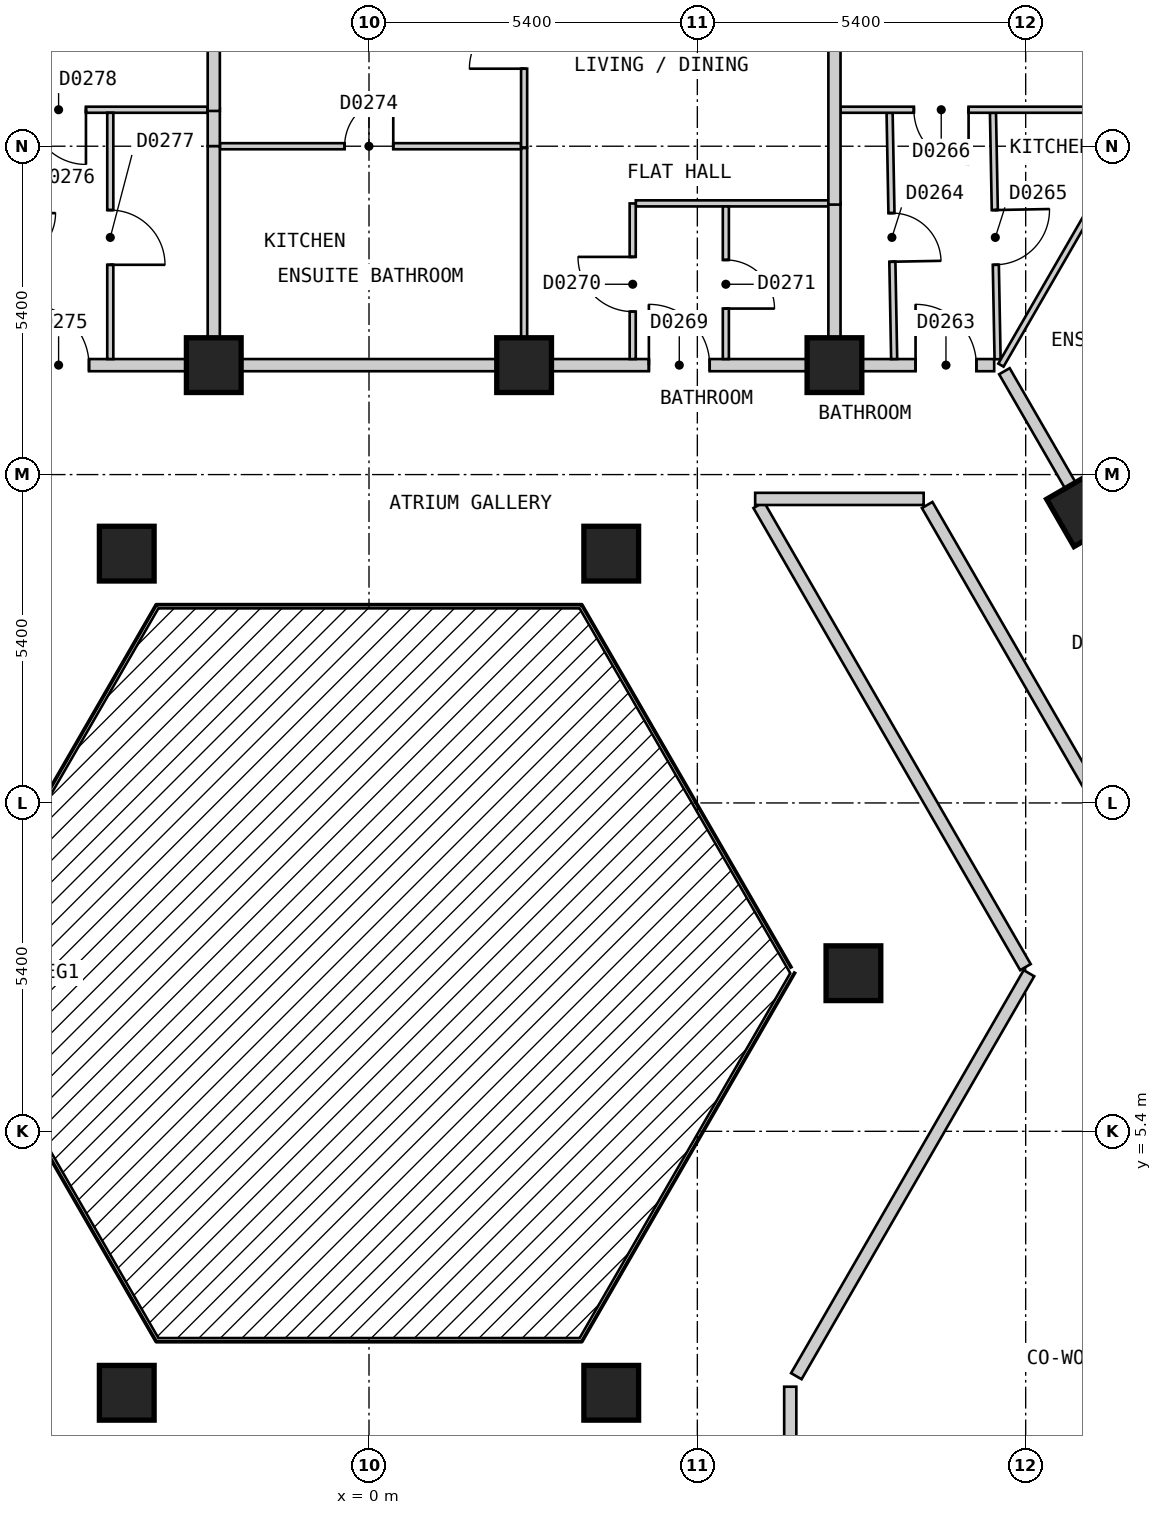
"""IFC4 building model, lengths in metres.
Left out: names, types, materials, properties, quantities, classifications, styles, units other than length and angle.
Written with IfcOpenShell. Run it as: python <this file> out.ifc"""

import sys

from ifc_helpers import new_model, si_unit, direction, frame, frame_2d, origin, origin_2d, place, context, subcontext, project, spatial, rectangle, extrude, element, fill, save


model = new_model("IFC4")
c1 = context("Model", 3, precision=1e-05, world=origin(), true_north=direction((0.0, 1.0)))
c2 = subcontext(c1, "Body", "Model", "MODEL_VIEW")
j1 = project(units=[si_unit("LENGTHUNIT", "METRE"), si_unit("PLANEANGLEUNIT", "RADIAN")], contexts=[c1])
p1 = place(None, origin())
s1 = spatial("IfcSite", under=j1, at=p1, CompositionType="ELEMENT")
p2 = place(p1, origin())
s2 = spatial("IfcBuilding", under=s1, at=p2, CompositionType="ELEMENT")
p3 = place(p2, frame((0.0, 0.0, 41.4)))
s3 = spatial("IfcBuildingStorey", under=s2, at=p3, CompositionType="ELEMENT", Elevation=41.4)
for number, where, z_axis, x_axis in (
    (1, (3.984, 1.1, 0.0), (0.0, 0.0, 1.0), (1.0, 0.0, 0.0)),
    (2, (7.967, 8.0, 0.0), (0.0, 0.0, 1.0), (1.0, 0.0, 0.0)),
    (3, (11.76, 15.631, 0.0), (0.0, 0.0, 1.0), (-0.5, 0.866, 0.0)),
    (4, (7.655, 18.0, 0.0), (0.0, 0.0, 1.0), (-1.0, 0.0, 0.0)),
    (5, (3.984, 14.9, 0.0), (0.0, 0.0, 1.0), (1.0, 0.0, 0.0)),
    (6, (2.551, 18.0, 0.0), (0.0, 0.0, 1.0), (-1.0, 0.0, 0.0)),
    (7, (-2.553, 18.0, 0.0), (0.0, 0.0, 1.0), (-1.0, 0.0, 0.0)),
    (8, (-3.984, 14.9, 0.0), (0.0, 0.0, 1.0), (1.0, 0.0, 0.0)),
    (9, (-3.984, 1.1, 0.0), (0.0, 0.0, 1.0), (1.0, 0.0, 0.0)),
):
    element("IfcColumn", number, at=place(p3, frame(where, z_axis=z_axis, x_axis=x_axis)), inside=s3, PredefinedType="COLUMN", context=c2, shape_type="SweptSolid", body=[
        extrude(rectangle(XDim=0.9, YDim=0.9, at=origin_2d()), origin(), (0.0, 0.0, 1.0), 3.0),
    ])
p4 = place(p3, frame((6.409, 15.7, 0.0), z_axis=(0.0, 0.0, 1.0), x_axis=(0.499930377127, -0.866065596838, 0.0)))
e10 = element("IfcWall", 10, at=p4, inside=s3, PredefinedType="PARTITIONING", context=c2, shape_type="SweptSolid", body=[
    extrude(rectangle(XDim=8.775, YDim=0.2, at=frame_2d((4.388, 0.0))), origin(), (0.0, 0.0, 1.0), 2.7),
])
p5 = place(p3, frame((9.18, 15.7, 0.0), z_axis=(0.0, 0.0, 1.0), x_axis=(0.500003652032, -0.866023295272, 0.0)))
e11 = element("IfcWall", 11, at=p5, inside=s3, PredefinedType="PARTITIONING", context=c2, shape_type="SweptSolid", body=[
    extrude(rectangle(XDim=18.012, YDim=0.2, at=frame_2d((9.006, 0.0))), origin(), (0.0, 0.0, 1.0), 2.7),
])
p6 = place(p5, frame((8.556, 0.0, 0.0)))
e12 = element("IfcOpeningElement", 12, at=p6, cuts=e11, PredefinedType="OPENING", context=c2, shape_type="SweptSolid", body=[
    extrude(rectangle(XDim=0.9, YDim=2.1, at=frame_2d((0.45, 1.05))), frame((0.0, 0.11, 0.0), z_axis=(0.0, -1.0, 0.0), x_axis=(1.0, 0.0, 0.0)), (0.0, 0.0, 1.0), 0.22),
])
p7 = place(p3, frame((10.45, 17.9, 0.0), z_axis=(0.0, 0.0, 1.0), x_axis=(0.500034352617, -0.866005569383, 0.0)))
e13 = element("IfcWall", 13, at=p7, inside=s3, PredefinedType="PARTITIONING", context=c2, shape_type="SweptSolid", body=[
    extrude(rectangle(XDim=20.553, YDim=0.2, at=frame_2d((10.276, 0.0))), origin(), (0.0, 0.0, 1.0), 2.7),
])
p8 = place(p7, frame((14.879, 0.0, 0.0)))
e14 = element("IfcOpeningElement", 14, at=p8, cuts=e13, PredefinedType="OPENING", context=c2, shape_type="SweptSolid", body=[
    extrude(rectangle(XDim=1.0, YDim=2.1, at=frame_2d((0.5, 1.05))), frame((0.0, 0.11, 0.0), z_axis=(0.0, -1.0, 0.0), x_axis=(1.0, 0.0, 0.0)), (0.0, 0.0, 1.0), 0.22),
])
p9 = place(p7, frame((9.775, 0.0, 0.0)))
e15 = element("IfcOpeningElement", 15, at=p9, cuts=e13, PredefinedType="OPENING", context=c2, shape_type="SweptSolid", body=[
    extrude(rectangle(XDim=1.0, YDim=2.1, at=frame_2d((0.5, 1.05))), frame((0.0, 0.11, 0.0), z_axis=(0.0, -1.0, 0.0), x_axis=(1.0, 0.0, 0.0)), (0.0, 0.0, 1.0), 0.22),
])
p10 = place(p7, frame((4.671, 0.0, 0.0)))
e16 = element("IfcOpeningElement", 16, at=p10, cuts=e13, PredefinedType="OPENING", context=c2, shape_type="SweptSolid", body=[
    extrude(rectangle(XDim=1.0, YDim=2.1, at=frame_2d((0.5, 1.05))), frame((0.0, 0.11, 0.0), z_axis=(0.0, -1.0, 0.0), x_axis=(1.0, 0.0, 0.0)), (0.0, 0.0, 1.0), 0.22),
])
p11 = place(p3, frame((6.351, 15.8, 0.0), z_axis=(0.0, 0.0, 1.0), x_axis=(1.0, 0.0, 0.0)))
e17 = element("IfcWall", 17, at=p11, inside=s3, PredefinedType="PARTITIONING", context=c2, shape_type="SweptSolid", body=[
    extrude(rectangle(XDim=2.771, YDim=0.2, at=frame_2d((1.385, 0.0))), origin(), (0.0, 0.0, 1.0), 2.7),
])
p12 = place(p3, frame((-10.276, 18.0, 0.0), z_axis=(0.0, 0.0, 1.0), x_axis=(1.0, 0.0, 0.0)))
e18 = element("IfcWall", 18, at=p12, inside=s3, PredefinedType="PARTITIONING", context=c2, shape_type="SweptSolid", body=[
    extrude(rectangle(XDim=20.558, YDim=0.2, at=frame_2d((10.279, 0.0))), origin(), (0.0, 0.0, 1.0), 2.7),
])
p13 = place(p12, frame((19.265, 0.0, 0.0)))
e19 = element("IfcOpeningElement", 19, at=p13, cuts=e18, PredefinedType="OPENING", context=c2, shape_type="SweptSolid", body=[
    extrude(rectangle(XDim=1.0, YDim=2.1, at=frame_2d((0.5, 1.05))), frame((0.0, 0.11, 0.0), z_axis=(0.0, -1.0, 0.0), x_axis=(1.0, 0.0, 0.0)), (0.0, 0.0, 1.0), 0.22),
])
p14 = place(p12, frame((14.879, 0.0, 0.0)))
e20 = element("IfcOpeningElement", 20, at=p14, cuts=e18, PredefinedType="OPENING", context=c2, shape_type="SweptSolid", body=[
    extrude(rectangle(XDim=1.0, YDim=2.1, at=frame_2d((0.5, 1.05))), frame((0.0, 0.11, 0.0), z_axis=(0.0, -1.0, 0.0), x_axis=(1.0, 0.0, 0.0)), (0.0, 0.0, 1.0), 0.22),
])
p15 = place(p12, frame((4.671, 0.0, 0.0)))
e21 = element("IfcOpeningElement", 21, at=p15, cuts=e18, PredefinedType="OPENING", context=c2, shape_type="SweptSolid", body=[
    extrude(rectangle(XDim=1.0, YDim=2.1, at=frame_2d((0.5, 1.05))), frame((0.0, 0.11, 0.0), z_axis=(0.0, -1.0, 0.0), x_axis=(1.0, 0.0, 0.0)), (0.0, 0.0, 1.0), 0.22),
])
p16 = place(p3, frame((7.028, 1.373, 0.0), z_axis=(0.0, 0.0, 1.0), x_axis=(0.49998574534, 0.86603363356, 0.0)))
e22 = element("IfcWall", 22, at=p16, inside=s3, PredefinedType="PARTITIONING", context=c2, shape_type="SweptSolid", body=[
    extrude(rectangle(XDim=7.652, YDim=0.2, at=frame_2d((3.826, 0.0))), origin(), (0.0, 0.0, 1.0), 2.7),
])
p17 = place(p3, frame((6.928, -2.8, 0.0), z_axis=(0.0, 0.0, 1.0), x_axis=(0.0, 1.0, 0.0)))
e23 = element("IfcWall", 23, at=p17, inside=s3, PredefinedType="PARTITIONING", context=c2, shape_type="SweptSolid", body=[
    extrude(rectangle(XDim=4.0, YDim=0.2, at=frame_2d((2.0, 0.0))), origin(), (0.0, 0.0, 1.0), 2.7),
])
p18 = place(p3, frame((8.562, 22.15, 0.0), z_axis=(0.0, 0.0, 1.0), x_axis=(0.018504185939, -0.999828782894, 0.0)))
e24 = element("IfcWall", 24, at=p18, inside=s3, PredefinedType="PARTITIONING", context=c2, shape_type="SweptSolid", body=[
    extrude(rectangle(XDim=4.051, YDim=0.1, at=frame_2d((2.025, 0.0))), origin(), (0.0, 0.0, 1.0), 2.7),
])
p19 = place(p18, frame((1.65, 0.0, 0.0)))
e25 = element("IfcOpeningElement", 25, at=p19, cuts=e24, PredefinedType="OPENING", context=c2, shape_type="SweptSolid", body=[
    extrude(rectangle(XDim=0.8, YDim=2.1, at=frame_2d((0.4, 1.05))), frame((0.0, 0.06, 0.0), z_axis=(0.0, -1.0, 0.0), x_axis=(1.0, 0.0, 0.0)), (0.0, 0.0, 1.0), 0.12),
])
p20 = place(p3, frame((10.262, 22.15, 0.0), z_axis=(0.0, 0.0, 1.0), x_axis=(0.018730524712, -0.999824568334, 0.0)))
e26 = element("IfcWall", 26, at=p20, inside=s3, PredefinedType="PARTITIONING", context=c2, shape_type="SweptSolid", body=[
    extrude(rectangle(XDim=4.054, YDim=0.1, at=frame_2d((2.027, 0.0))), origin(), (0.0, 0.0, 1.0), 2.7),
])
p21 = place(p20, frame((1.6, 0.0, 0.0)))
e27 = element("IfcOpeningElement", 27, at=p21, cuts=e26, PredefinedType="OPENING", context=c2, shape_type="SweptSolid", body=[
    extrude(rectangle(XDim=0.9, YDim=2.1, at=frame_2d((0.45, 1.05))), frame((0.0, 0.06, 0.0), z_axis=(0.0, -1.0, 0.0), x_axis=(1.0, 0.0, 0.0)), (0.0, 0.0, 1.0), 0.12),
])
p22 = place(p3, frame((2.551, 21.57, 0.0), z_axis=(0.0, 0.0, 1.0), x_axis=(0.0, -1.0, 0.0)))
e28 = element("IfcWall", 28, at=p22, inside=s3, PredefinedType="PARTITIONING", context=c2, shape_type="SweptSolid", body=[
    extrude(rectangle(XDim=3.47, YDim=0.1, at=frame_2d((1.735, 0.0))), origin(), (0.0, 0.0, 1.0), 2.7),
])
p23 = place(p3, frame((4.388, 20.66, 0.0), z_axis=(0.0, 0.0, 1.0), x_axis=(1.0, 0.0, 0.0)))
e29 = element("IfcWall", 29, at=p23, inside=s3, PredefinedType="PARTITIONING", context=c2, shape_type="SweptSolid", body=[
    extrude(rectangle(XDim=3.167, YDim=0.1, at=frame_2d((1.583, 0.0))), origin(), (0.0, 0.0, 1.0), 2.7),
])
p24 = place(p3, frame((-2.453, 21.6, 0.0), z_axis=(0.0, 0.0, 1.0), x_axis=(1.0, 0.0, 0.0)))
e30 = element("IfcWall", 30, at=p24, inside=s3, PredefinedType="PARTITIONING", context=c2, shape_type="SweptSolid", body=[
    extrude(rectangle(XDim=4.954, YDim=0.1, at=frame_2d((2.477, 0.0))), origin(), (0.0, 0.0, 1.0), 2.7),
])
p25 = place(p24, frame((2.052, 0.0, 0.0)))
e31 = element("IfcOpeningElement", 31, at=p25, cuts=e30, PredefinedType="OPENING", context=c2, shape_type="SweptSolid", body=[
    extrude(rectangle(XDim=0.8, YDim=2.1, at=frame_2d((0.4, 1.05))), frame((0.0, 0.06, 0.0), z_axis=(0.0, -1.0, 0.0), x_axis=(1.0, 0.0, 0.0)), (0.0, 0.0, 1.0), 0.12),
])
p26 = place(p3, frame((-12.711, 22.2, 0.0), z_axis=(0.0, 0.0, 1.0), x_axis=(1.0, 0.0, 0.0)))
e32 = element("IfcWall", 32, at=p26, inside=s3, PredefinedType="PARTITIONING", context=c2, shape_type="SweptSolid", body=[
    extrude(rectangle(XDim=10.058, YDim=0.1, at=frame_2d((5.029, 0.0))), origin(), (0.0, 0.0, 1.0), 2.7),
])
p27 = place(p26, frame((7.156, 0.0, 0.0)))
e33 = element("IfcOpeningElement", 33, at=p27, cuts=e32, PredefinedType="OPENING", context=c2, shape_type="SweptSolid", body=[
    extrude(rectangle(XDim=0.9, YDim=2.1, at=frame_2d((0.45, 1.05))), frame((0.0, 0.06, 0.0), z_axis=(0.0, -1.0, 0.0), x_axis=(1.0, 0.0, 0.0)), (0.0, 0.0, 1.0), 0.12),
])
p28 = place(p26, frame((2.102, 0.0, 0.0)))
e34 = element("IfcOpeningElement", 34, at=p28, cuts=e32, PredefinedType="OPENING", context=c2, shape_type="SweptSolid", body=[
    extrude(rectangle(XDim=0.8, YDim=2.1, at=frame_2d((0.4, 1.05))), frame((0.0, 0.06, 0.0), z_axis=(0.0, -1.0, 0.0), x_axis=(1.0, 0.0, 0.0)), (0.0, 0.0, 1.0), 0.12),
])
p29 = place(p3, frame((7.755, 22.2, 0.0), z_axis=(0.0, 0.0, 1.0), x_axis=(1.0, 0.0, 0.0)))
e35 = element("IfcWall", 35, at=p29, inside=s3, PredefinedType="PARTITIONING", context=c2, shape_type="SweptSolid", body=[
    extrude(rectangle(XDim=5.005, YDim=0.1, at=frame_2d((2.502, 0.0))), origin(), (0.0, 0.0, 1.0), 2.7),
])
p30 = place(p29, frame((1.206, 0.0, 0.0)))
e36 = element("IfcOpeningElement", 36, at=p30, cuts=e35, PredefinedType="OPENING", context=c2, shape_type="SweptSolid", body=[
    extrude(rectangle(XDim=0.9, YDim=2.1, at=frame_2d((0.45, 1.05))), frame((0.0, 0.06, 0.0), z_axis=(0.0, -1.0, 0.0), x_axis=(1.0, 0.0, 0.0)), (0.0, 0.0, 1.0), 0.12),
])
p31 = place(p3, frame((10.393, 18.0, 0.0), z_axis=(0.0, 0.0, 1.0), x_axis=(0.499945497007, 0.866056868816, 0.0)))
e37 = element("IfcWall", 37, at=p31, inside=s3, PredefinedType="PARTITIONING", context=c2, shape_type="SweptSolid", body=[
    extrude(rectangle(XDim=10.265, YDim=0.1, at=frame_2d((5.132, 0.0))), origin(), (0.0, 0.0, 1.0), 2.7),
])
p32 = place(p31, frame((7.108, 0.0, 0.0)))
e38 = element("IfcOpeningElement", 38, at=p32, cuts=e37, PredefinedType="OPENING", context=c2, shape_type="SweptSolid", body=[
    extrude(rectangle(XDim=0.9, YDim=2.1, at=frame_2d((0.45, 1.05))), frame((0.0, 0.06, 0.0), z_axis=(0.0, -1.0, 0.0), x_axis=(1.0, 0.0, 0.0)), (0.0, 0.0, 1.0), 0.12),
])
p33 = place(p3, frame((4.337, 18.1, 0.0), z_axis=(0.0, 0.0, 1.0), x_axis=(0.0, 1.0, 0.0)))
e39 = element("IfcWall", 39, at=p33, inside=s3, PredefinedType="PARTITIONING", context=c2, shape_type="SweptSolid", body=[
    extrude(rectangle(XDim=2.559, YDim=0.1, at=frame_2d((1.279, 0.0))), origin(), (0.0, 0.0, 1.0), 2.7),
])
p34 = place(p33, frame((0.78, 0.0, 0.0)))
e40 = element("IfcOpeningElement", 40, at=p34, cuts=e39, PredefinedType="OPENING", context=c2, shape_type="SweptSolid", body=[
    extrude(rectangle(XDim=0.9, YDim=2.1, at=frame_2d((0.45, 1.05))), frame((0.0, 0.06, 0.0), z_axis=(0.0, -1.0, 0.0), x_axis=(1.0, 0.0, 0.0)), (0.0, 0.0, 1.0), 0.12),
])
p35 = place(p3, frame((5.869, 18.1, 0.0), z_axis=(0.0, 0.0, 1.0), x_axis=(0.0, 1.0, 0.0)))
e41 = element("IfcWall", 41, at=p35, inside=s3, PredefinedType="PARTITIONING", context=c2, shape_type="SweptSolid", body=[
    extrude(rectangle(XDim=2.51, YDim=0.1, at=frame_2d((1.255, 0.0))), origin(), (0.0, 0.0, 1.0), 2.7),
])
p36 = place(p35, frame((0.83, 0.0, 0.0)))
e42 = element("IfcOpeningElement", 42, at=p36, cuts=e41, PredefinedType="OPENING", context=c2, shape_type="SweptSolid", body=[
    extrude(rectangle(XDim=0.8, YDim=2.1, at=frame_2d((0.4, 1.05))), frame((0.0, 0.06, 0.0), z_axis=(0.0, -1.0, 0.0), x_axis=(1.0, 0.0, 0.0)), (0.0, 0.0, 1.0), 0.12),
])
p37 = place(p3, frame((2.551, 21.58, 0.0), z_axis=(0.0, 0.0, 1.0), x_axis=(0.0, 1.0, 0.0)))
e43 = element("IfcWall", 43, at=p37, inside=s3, PredefinedType="PARTITIONING", context=c2, shape_type="SweptSolid", body=[
    extrude(rectangle(XDim=3.49, YDim=0.1, at=frame_2d((1.745, 0.0))), origin(), (0.0, 0.0, 1.0), 2.7),
])
p38 = place(p37, frame((1.295, 0.0, 0.0)))
e44 = element("IfcOpeningElement", 44, at=p38, cuts=e43, PredefinedType="OPENING", context=c2, shape_type="SweptSolid", body=[
    extrude(rectangle(XDim=0.9, YDim=2.1, at=frame_2d((0.45, 1.05))), frame((0.0, 0.06, 0.0), z_axis=(0.0, -1.0, 0.0), x_axis=(1.0, 0.0, 0.0)), (0.0, 0.0, 1.0), 0.12),
])
p39 = place(p3, frame((-4.255, 18.1, 0.0), z_axis=(0.0, 0.0, 1.0), x_axis=(0.0, 1.0, 0.0)))
e45 = element("IfcWall", 45, at=p39, inside=s3, PredefinedType="PARTITIONING", context=c2, shape_type="SweptSolid", body=[
    extrude(rectangle(XDim=4.05, YDim=0.1, at=frame_2d((2.025, 0.0))), origin(), (0.0, 0.0, 1.0), 2.7),
])
p40 = place(p39, frame((1.55, 0.0, 0.0)))
e46 = element("IfcOpeningElement", 46, at=p40, cuts=e45, PredefinedType="OPENING", context=c2, shape_type="SweptSolid", body=[
    extrude(rectangle(XDim=0.9, YDim=2.1, at=frame_2d((0.45, 1.05))), frame((0.0, 0.06, 0.0), z_axis=(0.0, -1.0, 0.0), x_axis=(1.0, 0.0, 0.0)), (0.0, 0.0, 1.0), 0.12),
])
p41 = place(p3, frame((-2.553, 22.22, 0.0), z_axis=(0.0, 0.0, 1.0), x_axis=(0.0, -1.0, 0.0)))
e47 = element("IfcWall", 47, at=p41, inside=s3, PredefinedType="PARTITIONING", context=c2, shape_type="SweptSolid", body=[
    extrude(rectangle(XDim=0.62, YDim=0.2, at=frame_2d((0.31, 0.0))), origin(), (0.0, 0.0, 1.0), 2.7),
])
p42 = place(p3, frame((7.655, 20.68, 0.0), z_axis=(0.0, 0.0, 1.0), x_axis=(0.0, -1.0, 0.0)))
e48 = element("IfcWall", 48, at=p42, inside=s3, PredefinedType="PARTITIONING", context=c2, shape_type="SweptSolid", body=[
    extrude(rectangle(XDim=2.58, YDim=0.2, at=frame_2d((1.29, 0.0))), origin(), (0.0, 0.0, 1.0), 2.7),
])
p43 = place(p3, frame((7.655, 20.64, 0.0), z_axis=(0.0, 0.0, 1.0), x_axis=(0.0, 1.0, 0.0)))
e49 = element("IfcWall", 49, at=p43, inside=s3, PredefinedType="PARTITIONING", context=c2, shape_type="SweptSolid", body=[
    extrude(rectangle(XDim=7.46, YDim=0.2, at=frame_2d((3.73, 0.0))), origin(), (0.0, 0.0, 1.0), 2.7),
])
p44 = place(p3, frame((-2.553, 18.1, 0.0), z_axis=(0.0, 0.0, 1.0), x_axis=(0.0, 1.0, 0.0)))
e50 = element("IfcWall", 50, at=p44, inside=s3, PredefinedType="PARTITIONING", context=c2, shape_type="SweptSolid", body=[
    extrude(rectangle(XDim=3.5, YDim=0.2, at=frame_2d((1.75, 0.0))), origin(), (0.0, 0.0, 1.0), 2.7),
])
p45 = place(p3, frame((-2.553, 22.18, 0.0), z_axis=(0.0, 0.0, 1.0), x_axis=(0.0, 1.0, 0.0)))
e51 = element("IfcWall", 51, at=p45, inside=s3, PredefinedType="PARTITIONING", context=c2, shape_type="SweptSolid", body=[
    extrude(rectangle(XDim=5.92, YDim=0.2, at=frame_2d((2.96, 0.0))), origin(), (0.0, 0.0, 1.0), 2.7),
])
p46 = place(p13, origin())
e52 = element("IfcDoor", 52, at=p46, inside=s3, OperationType="SINGLE_SWING_LEFT", PredefinedType="DOOR", context=c2, shape_type="SweptSolid", body=[
    extrude(rectangle(XDim=1.0, YDim=2.1, at=frame_2d((0.5, 1.05))), frame((0.0, 0.025, 0.0), z_axis=(0.0, -1.0, 0.0), x_axis=(1.0, 0.0, 0.0)), (0.0, 0.0, 1.0), 0.05),
])
fill(e19, e52)
p47 = place(p19, origin())
e53 = element("IfcDoor", 53, at=p47, inside=s3, OperationType="SINGLE_SWING_RIGHT", PredefinedType="DOOR", context=c2, shape_type="SweptSolid", body=[
    extrude(rectangle(XDim=0.8, YDim=2.1, at=frame_2d((0.4, 1.05))), frame((0.0, 0.025, 0.0), z_axis=(0.0, -1.0, 0.0), x_axis=(1.0, 0.0, 0.0)), (0.0, 0.0, 1.0), 0.05),
])
fill(e25, e53)
p48 = place(p21, origin())
e54 = element("IfcDoor", 54, at=p48, inside=s3, OperationType="SINGLE_SWING_LEFT", PredefinedType="DOOR", context=c2, shape_type="SweptSolid", body=[
    extrude(rectangle(XDim=0.9, YDim=2.1, at=frame_2d((0.45, 1.05))), frame((0.0, 0.025, 0.0), z_axis=(0.0, -1.0, 0.0), x_axis=(1.0, 0.0, 0.0)), (0.0, 0.0, 1.0), 0.05),
])
fill(e27, e54)
p49 = place(p30, origin())
e55 = element("IfcDoor", 55, at=p49, inside=s3, OperationType="SINGLE_SWING_RIGHT", PredefinedType="DOOR", context=c2, shape_type="SweptSolid", body=[
    extrude(rectangle(XDim=0.9, YDim=2.1, at=frame_2d((0.45, 1.05))), frame((0.0, 0.025, 0.0), z_axis=(0.0, -1.0, 0.0), x_axis=(1.0, 0.0, 0.0)), (0.0, 0.0, 1.0), 0.05),
])
fill(e36, e55)
p50 = place(p14, origin())
e56 = element("IfcDoor", 56, at=p50, inside=s3, OperationType="SINGLE_SWING_LEFT", PredefinedType="DOOR", context=c2, shape_type="SweptSolid", body=[
    extrude(rectangle(XDim=1.0, YDim=2.1, at=frame_2d((0.5, 1.05))), frame((0.0, 0.025, 0.0), z_axis=(0.0, -1.0, 0.0), x_axis=(1.0, 0.0, 0.0)), (0.0, 0.0, 1.0), 0.05),
])
fill(e20, e56)
p51 = place(p34, origin())
e57 = element("IfcDoor", 57, at=p51, inside=s3, OperationType="SINGLE_SWING_RIGHT", PredefinedType="DOOR", context=c2, shape_type="SweptSolid", body=[
    extrude(rectangle(XDim=0.9, YDim=2.1, at=frame_2d((0.45, 1.05))), frame((0.0, 0.025, 0.0), z_axis=(0.0, -1.0, 0.0), x_axis=(1.0, 0.0, 0.0)), (0.0, 0.0, 1.0), 0.05),
])
fill(e40, e57)
p52 = place(p36, origin())
e58 = element("IfcDoor", 58, at=p52, inside=s3, OperationType="SINGLE_SWING_LEFT", PredefinedType="DOOR", context=c2, shape_type="SweptSolid", body=[
    extrude(rectangle(XDim=0.8, YDim=2.1, at=frame_2d((0.4, 1.05))), frame((0.0, 0.025, 0.0), z_axis=(0.0, -1.0, 0.0), x_axis=(1.0, 0.0, 0.0)), (0.0, 0.0, 1.0), 0.05),
])
fill(e42, e58)
p53 = place(p38, origin())
e59 = element("IfcDoor", 59, at=p53, inside=s3, OperationType="SINGLE_SWING_LEFT", PredefinedType="DOOR", context=c2, shape_type="SweptSolid", body=[
    extrude(rectangle(XDim=0.9, YDim=2.1, at=frame_2d((0.45, 1.05))), frame((0.0, 0.025, 0.0), z_axis=(0.0, -1.0, 0.0), x_axis=(1.0, 0.0, 0.0)), (0.0, 0.0, 1.0), 0.05),
])
fill(e44, e59)
p54 = place(p25, origin())
e60 = element("IfcDoor", 60, at=p54, inside=s3, OperationType="SINGLE_SWING_RIGHT", PredefinedType="DOOR", context=c2, shape_type="SweptSolid", body=[
    extrude(rectangle(XDim=0.8, YDim=2.1, at=frame_2d((0.4, 1.05))), frame((0.0, 0.025, 0.0), z_axis=(0.0, -1.0, 0.0), x_axis=(1.0, 0.0, 0.0)), (0.0, 0.0, 1.0), 0.05),
])
fill(e31, e60)
p55 = place(p15, origin())
e61 = element("IfcDoor", 61, at=p55, inside=s3, OperationType="SINGLE_SWING_LEFT", PredefinedType="DOOR", context=c2, shape_type="SweptSolid", body=[
    extrude(rectangle(XDim=1.0, YDim=2.1, at=frame_2d((0.5, 1.05))), frame((0.0, 0.025, 0.0), z_axis=(0.0, -1.0, 0.0), x_axis=(1.0, 0.0, 0.0)), (0.0, 0.0, 1.0), 0.05),
])
fill(e21, e61)
p56 = place(p40, origin())
e62 = element("IfcDoor", 62, at=p56, inside=s3, OperationType="SINGLE_SWING_LEFT", PredefinedType="DOOR", context=c2, shape_type="SweptSolid", body=[
    extrude(rectangle(XDim=0.9, YDim=2.1, at=frame_2d((0.45, 1.05))), frame((0.0, 0.025, 0.0), z_axis=(0.0, -1.0, 0.0), x_axis=(1.0, 0.0, 0.0)), (0.0, 0.0, 1.0), 0.05),
])
fill(e46, e62)
p57 = place(p27, origin())
e63 = element("IfcDoor", 63, at=p57, inside=s3, OperationType="SINGLE_SWING_RIGHT", PredefinedType="DOOR", context=c2, shape_type="SweptSolid", body=[
    extrude(rectangle(XDim=0.9, YDim=2.1, at=frame_2d((0.45, 1.05))), frame((0.0, 0.025, 0.0), z_axis=(0.0, -1.0, 0.0), x_axis=(1.0, 0.0, 0.0)), (0.0, 0.0, 1.0), 0.05),
])
fill(e33, e63)
save(model, sys.argv[1])
